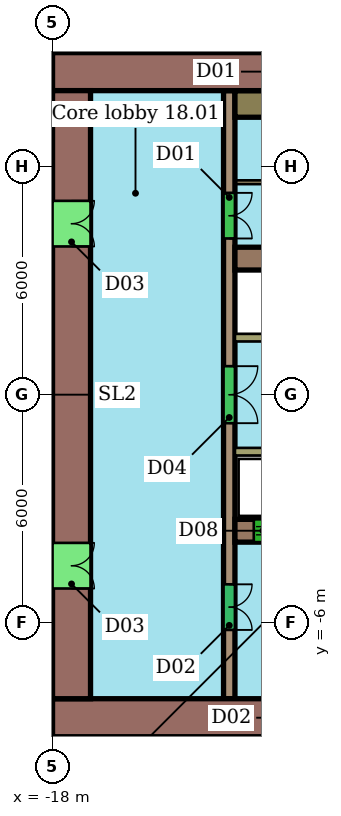
"""IFC4 building model, lengths in metres.
Left out: names, types, materials, properties, quantities, classifications, styles, units other than length and angle.
Written with IfcOpenShell. Run it as: python <this file> out.ifc"""

import sys

from ifc_helpers import new_model, si_unit, direction, frame, frame_2d, origin, place, context, subcontext, project, spatial, rectangle, extrude, element, fill, save


model = new_model("IFC4")
c1 = context("Model", 3, precision=1e-05, world=origin(), true_north=direction((0.0, 1.0)))
c2 = subcontext(c1, "Body", "Model", "MODEL_VIEW")
j1 = project(units=[si_unit("LENGTHUNIT", "METRE"), si_unit("PLANEANGLEUNIT", "RADIAN")], contexts=[c1])
p1 = place(None, origin())
s1 = spatial("IfcSite", under=j1, at=p1, CompositionType="ELEMENT")
p2 = place(p1, origin())
s2 = spatial("IfcBuilding", under=s1, at=p2, CompositionType="ELEMENT")
p3 = place(p2, frame((0.0, 0.0, 84.1)))
s3 = spatial("IfcBuildingStorey", under=s2, at=p3, CompositionType="ELEMENT", Elevation=84.1)
p4 = place(p3, frame((-6.0, 8.5, 0.0), z_axis=(0.0, 0.0, 1.0), x_axis=(-1.0, 0.0, 0.0)))
e1 = element("IfcWall", 1, at=p4, inside=s3, PredefinedType="SHEAR", context=c2, shape_type="SweptSolid", body=[
    extrude(rectangle(XDim=12.0, YDim=1.0, at=frame_2d((6.0, 0.0))), origin(), (0.0, 0.0, 1.0), 4.2),
])
p5 = place(p4, frame((5.2, 0.0, 0.0)))
e2 = element("IfcOpeningElement", 2, at=p5, cuts=e1, PredefinedType="OPENING", context=c2, shape_type="SweptSolid", body=[
    extrude(rectangle(XDim=1.2, YDim=2.1, at=frame_2d((0.6, 1.05))), frame((0.0, 0.51, 0.0), z_axis=(0.0, -1.0, 0.0), x_axis=(1.0, 0.0, 0.0)), (0.0, 0.0, 1.0), 1.02),
])
p6 = place(p3, frame((-18.0, -8.5, 0.0), z_axis=(0.0, 0.0, 1.0), x_axis=(1.0, 0.0, 0.0)))
e3 = element("IfcWall", 3, at=p6, inside=s3, PredefinedType="SHEAR", context=c2, shape_type="SweptSolid", body=[
    extrude(rectangle(XDim=24.0, YDim=1.0, at=frame_2d((12.0, 0.0))), origin(), (0.0, 0.0, 1.0), 4.2),
])
p7 = place(p6, frame((10.2, 0.0, 0.0)))
e4 = element("IfcOpeningElement", 4, at=p7, cuts=e3, PredefinedType="OPENING", context=c2, shape_type="SweptSolid", body=[
    extrude(rectangle(XDim=1.2, YDim=2.1, at=frame_2d((0.6, 1.05))), frame((0.0, 0.51, 0.0), z_axis=(0.0, -1.0, 0.0), x_axis=(1.0, 0.0, 0.0)), (0.0, 0.0, 1.0), 1.02),
])
p8 = place(p6, frame((6.0, 0.0, 0.0)))
e5 = element("IfcOpeningElement", 5, at=p8, cuts=e3, PredefinedType="OPENING", context=c2, shape_type="SweptSolid", body=[
    extrude(rectangle(XDim=1.2, YDim=2.1, at=frame_2d((0.6, 1.05))), frame((0.0, 0.51, 0.0), z_axis=(0.0, -1.0, 0.0), x_axis=(1.0, 0.0, 0.0)), (0.0, 0.0, 1.0), 1.02),
])
p9 = place(p3, frame((-17.5, 8.0, 0.0), z_axis=(0.0, 0.0, 1.0), x_axis=(0.0, -1.0, 0.0)))
e6 = element("IfcWall", 6, at=p9, inside=s3, PredefinedType="SHEAR", context=c2, shape_type="SweptSolid", body=[
    extrude(rectangle(XDim=16.0, YDim=1.0, at=frame_2d((8.0, 0.0))), origin(), (0.0, 0.0, 1.0), 4.2),
])
p10 = place(p9, frame((11.9, 0.0, 0.0)))
e7 = element("IfcOpeningElement", 7, at=p10, cuts=e6, PredefinedType="OPENING", context=c2, shape_type="SweptSolid", body=[
    extrude(rectangle(XDim=1.2, YDim=2.1, at=frame_2d((0.6, 1.05))), frame((0.0, 0.51, 0.0), z_axis=(0.0, -1.0, 0.0), x_axis=(1.0, 0.0, 0.0)), (0.0, 0.0, 1.0), 1.02),
])
p11 = place(p9, frame((2.9, 0.0, 0.0)))
e8 = element("IfcOpeningElement", 8, at=p11, cuts=e6, PredefinedType="OPENING", context=c2, shape_type="SweptSolid", body=[
    extrude(rectangle(XDim=1.2, YDim=2.1, at=frame_2d((0.6, 1.05))), frame((0.0, 0.51, 0.0), z_axis=(0.0, -1.0, 0.0), x_axis=(1.0, 0.0, 0.0)), (0.0, 0.0, 1.0), 1.02),
])
p12 = place(p3, frame((-13.2, 3.58, 0.0), z_axis=(0.0, 0.0, 1.0), x_axis=(1.0, 0.0, 0.0)))
e9 = element("IfcWall", 9, at=p12, inside=s3, PredefinedType="SHEAR", context=c2, shape_type="SweptSolid", body=[
    extrude(rectangle(XDim=7.2, YDim=0.6, at=frame_2d((3.6, 0.0))), origin(), (0.0, 0.0, 1.0), 4.2),
])
p13 = place(p3, frame((-13.2, -3.58, 0.0), z_axis=(0.0, 0.0, 1.0), x_axis=(1.0, 0.0, 0.0)))
e10 = element("IfcWall", 10, at=p13, inside=s3, PredefinedType="SHEAR", context=c2, shape_type="SweptSolid", body=[
    extrude(rectangle(XDim=7.2, YDim=0.6, at=frame_2d((3.6, 0.0))), origin(), (0.0, 0.0, 1.0), 4.2),
])
p14 = place(p13, frame((0.496, 0.0, 0.0)))
e11 = element("IfcOpeningElement", 11, at=p14, cuts=e10, PredefinedType="OPENING", context=c2, shape_type="SweptSolid", body=[
    extrude(rectangle(XDim=1.2, YDim=2.1, at=frame_2d((0.6, 1.05))), frame((0.0, 0.31, 0.0), z_axis=(0.0, -1.0, 0.0), x_axis=(1.0, 0.0, 0.0)), (0.0, 0.0, 1.0), 0.62),
])
p15 = place(p13, frame((2.938, 0.0, 0.0)))
e12 = element("IfcOpeningElement", 12, at=p15, cuts=e10, PredefinedType="OPENING", context=c2, shape_type="SweptSolid", body=[
    extrude(rectangle(XDim=1.2, YDim=2.1, at=frame_2d((0.6, 1.05))), frame((0.0, 0.31, 0.0), z_axis=(0.0, -1.0, 0.0), x_axis=(1.0, 0.0, 0.0)), (0.0, 0.0, 1.0), 0.62),
])
p16 = place(p3, frame((-13.35, 8.0, 0.0), z_axis=(0.0, 0.0, 1.0), x_axis=(0.0, -1.0, 0.0)))
e13 = element("IfcWall", 13, at=p16, inside=s3, PredefinedType="SHEAR", context=c2, shape_type="SweptSolid", body=[
    extrude(rectangle(XDim=16.0, YDim=0.3, at=frame_2d((8.0, 0.0))), origin(), (0.0, 0.0, 1.0), 4.2),
])
p17 = place(p16, frame((2.69, 0.0, 0.0)))
e14 = element("IfcOpeningElement", 14, at=p17, cuts=e13, PredefinedType="OPENING", context=c2, shape_type="SweptSolid", body=[
    extrude(rectangle(XDim=1.2, YDim=2.1, at=frame_2d((0.6, 1.05))), frame((0.0, 0.16, 0.0), z_axis=(0.0, -1.0, 0.0), x_axis=(1.0, 0.0, 0.0)), (0.0, 0.0, 1.0), 0.32),
])
p18 = place(p16, frame((12.99, 0.0, 0.0)))
e15 = element("IfcOpeningElement", 15, at=p18, cuts=e13, PredefinedType="OPENING", context=c2, shape_type="SweptSolid", body=[
    extrude(rectangle(XDim=1.2, YDim=2.1, at=frame_2d((0.6, 1.05))), frame((0.0, 0.16, 0.0), z_axis=(0.0, -1.0, 0.0), x_axis=(1.0, 0.0, 0.0)), (0.0, 0.0, 1.0), 0.32),
])
p19 = place(p16, frame((7.25, 0.0, 0.0)))
e16 = element("IfcOpeningElement", 16, at=p19, cuts=e13, PredefinedType="OPENING", context=c2, shape_type="SweptSolid", body=[
    extrude(rectangle(XDim=1.5, YDim=2.1, at=frame_2d((0.75, 1.05))), frame((0.0, 0.16, 0.0), z_axis=(0.0, -1.0, 0.0), x_axis=(1.0, 0.0, 0.0)), (0.0, 0.0, 1.0), 0.32),
])
p20 = place(p3, frame((-13.2, 1.5, 0.0), z_axis=(0.0, 0.0, 1.0), x_axis=(1.0, 0.0, 0.0)))
e17 = element("IfcWall", 17, at=p20, inside=s3, PredefinedType="SHEAR", context=c2, shape_type="SweptSolid", body=[
    extrude(rectangle(XDim=14.4, YDim=0.2, at=frame_2d((7.2, 0.0))), origin(), (0.0, 0.0, 1.0), 4.2),
])
p21 = place(p20, frame((10.958, 0.0, 0.0)))
e18 = element("IfcOpeningElement", 18, at=p21, cuts=e17, PredefinedType="OPENING", context=c2, shape_type="SweptSolid", body=[
    extrude(rectangle(XDim=0.9, YDim=2.1, at=frame_2d((0.45, 1.05))), frame((0.0, 0.11, 0.0), z_axis=(0.0, -1.0, 0.0), x_axis=(1.0, 0.0, 0.0)), (0.0, 0.0, 1.0), 0.22),
])
p22 = place(p20, frame((13.35, 0.0, 0.0)))
e19 = element("IfcOpeningElement", 19, at=p22, cuts=e17, PredefinedType="OPENING", context=c2, shape_type="SweptSolid", body=[
    extrude(rectangle(XDim=0.9, YDim=2.1, at=frame_2d((0.45, 1.05))), frame((0.0, 0.11, 0.0), z_axis=(0.0, -1.0, 0.0), x_axis=(1.0, 0.0, 0.0)), (0.0, 0.0, 1.0), 0.22),
])
p23 = place(p3, frame((1.2, -1.5, 0.0), z_axis=(0.0, 0.0, 1.0), x_axis=(-1.0, 0.0, 0.0)))
e20 = element("IfcWall", 20, at=p23, inside=s3, PredefinedType="SHEAR", context=c2, shape_type="SweptSolid", body=[
    extrude(rectangle(XDim=14.4, YDim=0.2, at=frame_2d((7.2, 0.0))), origin(), (0.0, 0.0, 1.0), 4.2),
])
p24 = place(p23, frame((0.15, 0.0, 0.0)))
e21 = element("IfcOpeningElement", 21, at=p24, cuts=e20, PredefinedType="OPENING", context=c2, shape_type="SweptSolid", body=[
    extrude(rectangle(XDim=1.0, YDim=2.1, at=frame_2d((0.5, 1.05))), frame((0.0, 0.11, 0.0), z_axis=(0.0, -1.0, 0.0), x_axis=(1.0, 0.0, 0.0)), (0.0, 0.0, 1.0), 0.22),
])
p25 = place(p3, frame((-13.2, 7.65, 0.0), z_axis=(0.0, 0.0, 1.0), x_axis=(1.0, 0.0, 0.0)))
e22 = element("IfcWall", 22, at=p25, inside=s3, PredefinedType="SHEAR", context=c2, shape_type="SweptSolid", body=[
    extrude(rectangle(XDim=0.8, YDim=0.7, at=frame_2d((0.4, 0.0))), origin(), (0.0, 0.0, 1.0), 4.2),
])
p26 = place(p3, frame((-13.2, 5.59, 0.0), z_axis=(0.0, 0.0, 1.0), x_axis=(1.0, 0.0, 0.0)))
e23 = element("IfcWall", 23, at=p26, inside=s3, PredefinedType="SHEAR", context=c2, shape_type="SweptSolid", body=[
    extrude(rectangle(XDim=2.2, YDim=0.1, at=frame_2d((1.1, 0.0))), origin(), (0.0, 0.0, 1.0), 4.2),
])
p27 = place(p10, origin())
e24 = element("IfcDoor", 24, at=p27, inside=s3, OperationType="DOUBLE_DOOR_SINGLE_SWING", PredefinedType="NOTDEFINED", context=c2, shape_type="SweptSolid", body=[
    extrude(rectangle(XDim=1.2, YDim=2.1, at=frame_2d((0.6, 1.05))), frame((0.0, 0.025, 0.0), z_axis=(0.0, -1.0, 0.0), x_axis=(1.0, 0.0, 0.0)), (0.0, 0.0, 1.0), 0.05),
])
fill(e7, e24)
p28 = place(p11, origin())
e25 = element("IfcDoor", 25, at=p28, inside=s3, OperationType="DOUBLE_DOOR_SINGLE_SWING", PredefinedType="NOTDEFINED", context=c2, shape_type="SweptSolid", body=[
    extrude(rectangle(XDim=1.2, YDim=2.1, at=frame_2d((0.6, 1.05))), frame((0.0, 0.025, 0.0), z_axis=(0.0, -1.0, 0.0), x_axis=(1.0, 0.0, 0.0)), (0.0, 0.0, 1.0), 0.05),
])
fill(e8, e25)
p29 = place(p14, origin())
e26 = element("IfcDoor", 26, at=p29, inside=s3, OperationType="DOUBLE_DOOR_SLIDING", PredefinedType="NOTDEFINED", context=c2, shape_type="SweptSolid", body=[
    extrude(rectangle(XDim=1.2, YDim=2.1, at=frame_2d((0.6, 1.05))), frame((0.0, 0.025, 0.0), z_axis=(0.0, -1.0, 0.0), x_axis=(1.0, 0.0, 0.0)), (0.0, 0.0, 1.0), 0.05),
])
fill(e11, e26)
p30 = place(p17, origin())
e27 = element("IfcDoor", 27, at=p30, inside=s3, OperationType="DOUBLE_DOOR_SINGLE_SWING", PredefinedType="NOTDEFINED", context=c2, shape_type="SweptSolid", body=[
    extrude(rectangle(XDim=1.2, YDim=2.1, at=frame_2d((0.6, 1.05))), frame((0.0, 0.025, 0.0), z_axis=(0.0, -1.0, 0.0), x_axis=(1.0, 0.0, 0.0)), (0.0, 0.0, 1.0), 0.05),
])
fill(e14, e27)
p31 = place(p18, origin())
e28 = element("IfcDoor", 28, at=p31, inside=s3, OperationType="DOUBLE_DOOR_SINGLE_SWING", PredefinedType="NOTDEFINED", context=c2, shape_type="SweptSolid", body=[
    extrude(rectangle(XDim=1.2, YDim=2.1, at=frame_2d((0.6, 1.05))), frame((0.0, 0.025, 0.0), z_axis=(0.0, -1.0, 0.0), x_axis=(1.0, 0.0, 0.0)), (0.0, 0.0, 1.0), 0.05),
])
fill(e15, e28)
p32 = place(p19, origin())
e29 = element("IfcDoor", 29, at=p32, inside=s3, OperationType="DOUBLE_DOOR_SINGLE_SWING", PredefinedType="NOTDEFINED", context=c2, shape_type="SweptSolid", body=[
    extrude(rectangle(XDim=1.5, YDim=2.1, at=frame_2d((0.75, 1.05))), frame((0.0, 0.025, 0.0), z_axis=(0.0, -1.0, 0.0), x_axis=(1.0, 0.0, 0.0)), (0.0, 0.0, 1.0), 0.05),
])
fill(e16, e29)
save(model, sys.argv[1])
